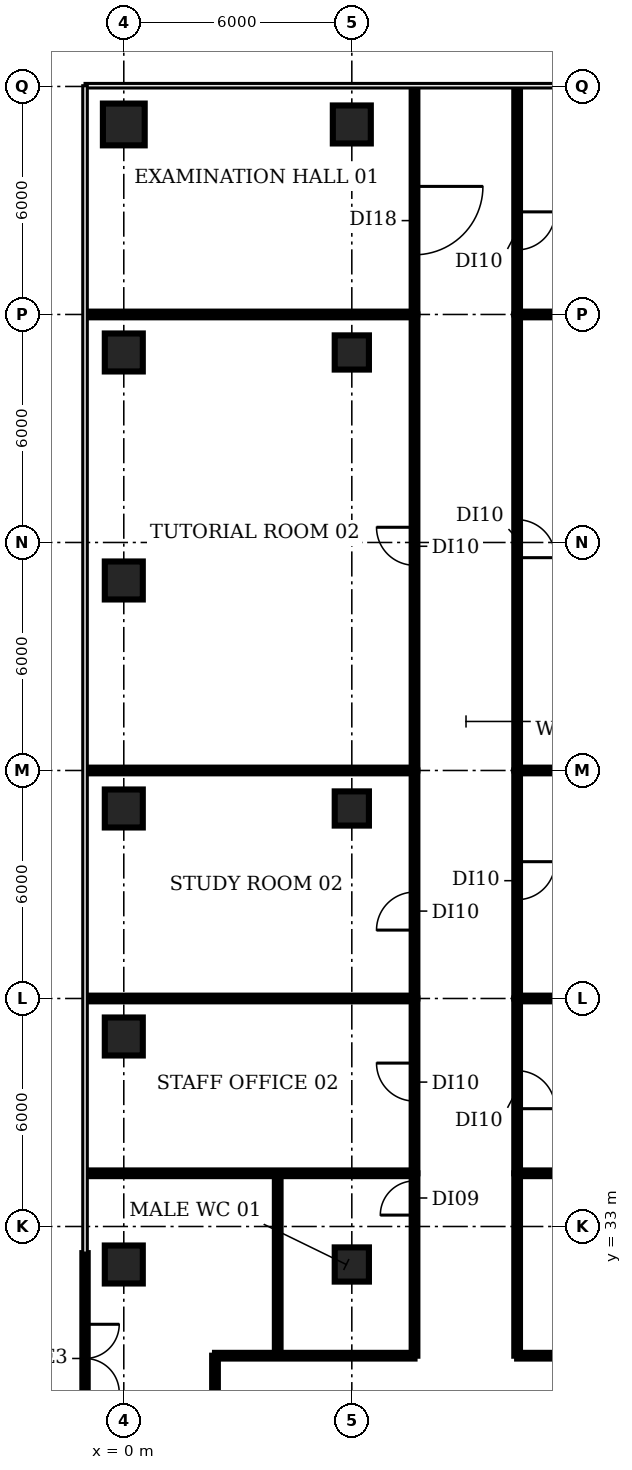
"""IFC4 building model, lengths in metres.
Left out: names, types, materials, properties, quantities, classifications, styles, units other than length and angle.
Written with IfcOpenShell. Run it as: python <this file> out.ifc"""

import sys

from ifc_helpers import new_model, si_unit, direction, frame, frame_2d, origin, origin_2d, place, context, subcontext, project, spatial, rectangle, circle, extrude, element, fill, save


model = new_model("IFC4")
c1 = context("Model", 3, precision=1e-05, world=origin(), true_north=direction((0.0, 1.0)))
c2 = subcontext(c1, "Body", "Model", "MODEL_VIEW")
j1 = project(units=[si_unit("LENGTHUNIT", "METRE"), si_unit("PLANEANGLEUNIT", "RADIAN")], contexts=[c1])
p1 = place(None, origin())
s1 = spatial("IfcSite", under=j1, at=p1, CompositionType="ELEMENT")
p2 = place(p1, origin())
s2 = spatial("IfcBuilding", under=s1, at=p2, CompositionType="ELEMENT")
p3 = place(p2, frame((0.0, 0.0, 11.0)))
s3 = spatial("IfcBuildingStorey", under=s2, at=p3, CompositionType="ELEMENT", Elevation=11.0)
for number, where, z_axis, x_axis in (
    (1, (0.0, 32.0, 0.0), (0.0, 0.0, 1.0), (1.0, 0.0, 0.0)),
    (2, (0.0, 38.0, 0.0), (0.0, 0.0, 1.0), (1.0, 0.0, 0.0)),
    (3, (0.0, 44.0, 0.0), (0.0, 0.0, 1.0), (1.0, 0.0, 0.0)),
    (4, (0.0, 50.0, 0.0), (0.0, 0.0, 1.0), (1.0, 0.0, 0.0)),
    (5, (0.0, 56.0, 0.0), (0.0, 0.0, 1.0), (1.0, 0.0, 0.0)),
):
    element("IfcColumn", number, at=place(p3, frame(where, z_axis=z_axis, x_axis=x_axis)), inside=s3, PredefinedType="COLUMN", context=c2, shape_type="SweptSolid", body=[
        extrude(rectangle(XDim=1.0, YDim=1.0, at=origin_2d()), origin(), (0.0, 0.0, 1.0), 4.15),
    ])
p4 = place(p3, frame((0.0, 62.0, 0.0), z_axis=(0.0, 0.0, 1.0), x_axis=(1.0, 0.0, 0.0)))
e6 = element("IfcColumn", 6, at=p4, inside=s3, PredefinedType="COLUMN", context=c2, shape_type="SweptSolid", body=[
    extrude(circle(Radius=0.55, at=origin_2d()), origin(), (0.0, 0.0, 1.0), 4.15),
])
for number, where, z_axis, x_axis in (
    (7, (6.0, 32.0, 0.0), (0.0, 0.0, 1.0), (1.0, 0.0, 0.0)),
    (8, (6.0, 44.0, 0.0), (0.0, 0.0, 1.0), (1.0, 0.0, 0.0)),
    (9, (6.0, 56.0, 0.0), (0.0, 0.0, 1.0), (1.0, 0.0, 0.0)),
):
    element("IfcColumn", number, at=place(p3, frame(where, z_axis=z_axis, x_axis=x_axis)), inside=s3, PredefinedType="COLUMN", context=c2, shape_type="SweptSolid", body=[
        extrude(rectangle(XDim=0.9, YDim=0.9, at=origin_2d()), origin(), (0.0, 0.0, 1.0), 4.15),
    ])
p5 = place(p3, frame((6.0, 62.0, 0.0), z_axis=(0.0, 0.0, 1.0), x_axis=(1.0, 0.0, 0.0)))
e10 = element("IfcColumn", 10, at=p5, inside=s3, PredefinedType="COLUMN", context=c2, shape_type="SweptSolid", body=[
    extrude(rectangle(XDim=1.0, YDim=1.0, at=origin_2d()), origin(), (0.0, 0.0, 1.0), 4.15),
])
p6 = place(p3, frame((-1.02, 32.299, 0.0), z_axis=(0.0, 0.0, 1.0), x_axis=(0.0, -1.0, 0.0)))
e11 = element("IfcWall", 11, at=p6, inside=s3, PredefinedType="SOLIDWALL", context=c2, shape_type="SweptSolid", body=[
    extrude(rectangle(XDim=6.144, YDim=0.14, at=frame_2d((3.072, 0.0))), origin(), (0.0, 0.0, 1.0), 4.15),
])
p7 = place(p6, frame((1.872, 0.0, 0.0)))
e12 = element("IfcOpeningElement", 12, at=p7, cuts=e11, PredefinedType="OPENING", context=c2, shape_type="SweptSolid", body=[
    extrude(rectangle(XDim=1.8, YDim=2.4, at=frame_2d((0.9, 1.2))), frame((0.0, 0.08, 0.0), z_axis=(0.0, -1.0, 0.0), x_axis=(1.0, 0.0, 0.0)), (0.0, 0.0, 1.0), 0.16),
])
for number, where, z_axis, x_axis in (
    (13, (-0.97, 34.4, 0.0), (0.0, 0.0, 1.0), (1.0, 0.0, 0.0)),
    (14, (-0.97, 39.0, 0.0), (0.0, 0.0, 1.0), (1.0, 0.0, 0.0)),
    (15, (-0.97, 45.0, 0.0), (0.0, 0.0, 1.0), (1.0, 0.0, 0.0)),
):
    element("IfcWall", number, at=place(p3, frame(where, z_axis=z_axis, x_axis=x_axis)), inside=s3, PredefinedType="PARTITIONING", context=c2, shape_type="SweptSolid", body=[
        extrude(rectangle(XDim=8.62, YDim=0.15, at=frame_2d((4.31, 0.0))), origin(), (0.0, 0.0, 1.0), 3.08),
    ])
p8 = place(p3, frame((-0.955, 57.0, 0.0), z_axis=(0.0, 0.0, 1.0), x_axis=(1.0, 0.0, 0.0)))
e16 = element("IfcWall", 16, at=p8, inside=s3, PredefinedType="PARTITIONING", context=c2, shape_type="SweptSolid", body=[
    extrude(rectangle(XDim=8.605, YDim=0.15, at=frame_2d((4.302, 0.0))), origin(), (0.0, 0.0, 1.0), 3.08),
])
p9 = place(p3, frame((2.4, 25.7, 0.0), z_axis=(0.0, 0.0, 1.0), x_axis=(0.0, 1.0, 0.0)))
e17 = element("IfcWall", 17, at=p9, inside=s3, PredefinedType="PARTITIONING", context=c2, shape_type="SweptSolid", body=[
    extrude(rectangle(XDim=3.9, YDim=0.15, at=frame_2d((1.95, 0.0))), origin(), (0.0, 0.0, 1.0), 3.08),
])
p10 = place(p3, frame((2.4, 29.6, 0.0), z_axis=(0.0, 0.0, 1.0), x_axis=(1.0, 0.0, 0.0)))
e18 = element("IfcWall", 18, at=p10, inside=s3, PredefinedType="PARTITIONING", context=c2, shape_type="SweptSolid", body=[
    extrude(rectangle(XDim=5.25, YDim=0.15, at=frame_2d((2.625, 0.0))), origin(), (0.0, 0.0, 1.0), 3.08),
])
p11 = place(p3, frame((4.05, 29.6, 0.0), z_axis=(0.0, 0.0, 1.0), x_axis=(0.0, 1.0, 0.0)))
e19 = element("IfcWall", 19, at=p11, inside=s3, PredefinedType="PARTITIONING", context=c2, shape_type="SweptSolid", body=[
    extrude(rectangle(XDim=4.8, YDim=0.15, at=frame_2d((2.4, 0.0))), origin(), (0.0, 0.0, 1.0), 3.08),
])
p12 = place(p3, frame((7.65, 29.6, 0.0), z_axis=(0.0, 0.0, 1.0), x_axis=(0.0, 1.0, 0.0)))
e20 = element("IfcWall", 20, at=p12, inside=s3, PredefinedType="PARTITIONING", context=c2, shape_type="SweptSolid", body=[
    extrude(rectangle(XDim=4.8, YDim=0.15, at=frame_2d((2.4, 0.0))), origin(), (0.0, 0.0, 1.0), 3.08),
])
p13 = place(p12, frame((3.7, 0.0, 0.0)))
e21 = element("IfcOpeningElement", 21, at=p13, cuts=e20, PredefinedType="OPENING", context=c2, shape_type="SweptSolid", body=[
    extrude(rectangle(XDim=0.9, YDim=2.1, at=frame_2d((0.45, 1.05))), frame((0.0, 0.085, 0.0), z_axis=(0.0, -1.0, 0.0), x_axis=(1.0, 0.0, 0.0)), (0.0, 0.0, 1.0), 0.17),
])
p14 = place(p3, frame((7.65, 34.4, 0.0), z_axis=(0.0, 0.0, 1.0), x_axis=(0.0, 1.0, 0.0)))
e22 = element("IfcWall", 22, at=p14, inside=s3, PredefinedType="PARTITIONING", context=c2, shape_type="SweptSolid", body=[
    extrude(rectangle(XDim=4.6, YDim=0.15, at=frame_2d((2.3, 0.0))), origin(), (0.0, 0.0, 1.0), 3.08),
])
p15 = place(p14, frame((1.9, 0.0, 0.0)))
e23 = element("IfcOpeningElement", 23, at=p15, cuts=e22, PredefinedType="OPENING", context=c2, shape_type="SweptSolid", body=[
    extrude(rectangle(XDim=1.0, YDim=2.1, at=frame_2d((0.5, 1.05))), frame((0.0, 0.085, 0.0), z_axis=(0.0, -1.0, 0.0), x_axis=(1.0, 0.0, 0.0)), (0.0, 0.0, 1.0), 0.17),
])
p16 = place(p3, frame((7.65, 39.0, 0.0), z_axis=(0.0, 0.0, 1.0), x_axis=(0.0, 1.0, 0.0)))
e24 = element("IfcWall", 24, at=p16, inside=s3, PredefinedType="PARTITIONING", context=c2, shape_type="SweptSolid", body=[
    extrude(rectangle(XDim=6.0, YDim=0.15, at=frame_2d((3.0, 0.0))), origin(), (0.0, 0.0, 1.0), 3.08),
])
p17 = place(p16, frame((1.8, 0.0, 0.0)))
e25 = element("IfcOpeningElement", 25, at=p17, cuts=e24, PredefinedType="OPENING", context=c2, shape_type="SweptSolid", body=[
    extrude(rectangle(XDim=1.0, YDim=2.1, at=frame_2d((0.5, 1.05))), frame((0.0, 0.085, 0.0), z_axis=(0.0, -1.0, 0.0), x_axis=(1.0, 0.0, 0.0)), (0.0, 0.0, 1.0), 0.17),
])
p18 = place(p3, frame((7.65, 45.0, 0.0), z_axis=(0.0, 0.0, 1.0), x_axis=(0.0, 1.0, 0.0)))
e26 = element("IfcWall", 26, at=p18, inside=s3, PredefinedType="PARTITIONING", context=c2, shape_type="SweptSolid", body=[
    extrude(rectangle(XDim=12.0, YDim=0.15, at=frame_2d((6.0, 0.0))), origin(), (0.0, 0.0, 1.0), 3.08),
])
p19 = place(p18, frame((5.4, 0.0, 0.0)))
e27 = element("IfcOpeningElement", 27, at=p19, cuts=e26, PredefinedType="OPENING", context=c2, shape_type="SweptSolid", body=[
    extrude(rectangle(XDim=1.0, YDim=2.1, at=frame_2d((0.5, 1.05))), frame((0.0, 0.085, 0.0), z_axis=(0.0, -1.0, 0.0), x_axis=(1.0, 0.0, 0.0)), (0.0, 0.0, 1.0), 0.17),
])
p20 = place(p3, frame((7.65, 62.97, 0.0), z_axis=(0.0, 0.0, 1.0), x_axis=(0.0, -1.0, 0.0)))
e28 = element("IfcWall", 28, at=p20, inside=s3, PredefinedType="PARTITIONING", context=c2, shape_type="SweptSolid", body=[
    extrude(rectangle(XDim=5.97, YDim=0.15, at=frame_2d((2.985, 0.0))), origin(), (0.0, 0.0, 1.0), 3.08),
])
p21 = place(p20, frame((2.6, 0.0, 0.0)))
e29 = element("IfcOpeningElement", 29, at=p21, cuts=e28, PredefinedType="OPENING", context=c2, shape_type="SweptSolid", body=[
    extrude(rectangle(XDim=1.8, YDim=2.1, at=frame_2d((0.9, 1.05))), frame((0.0, 0.085, 0.0), z_axis=(0.0, -1.0, 0.0), x_axis=(1.0, 0.0, 0.0)), (0.0, 0.0, 1.0), 0.17),
])
p22 = place(p3, frame((10.35, 29.6, 0.0), z_axis=(0.0, 0.0, 1.0), x_axis=(0.0, 1.0, 0.0)))
e30 = element("IfcWall", 30, at=p22, inside=s3, PredefinedType="PARTITIONING", context=c2, shape_type="SweptSolid", body=[
    extrude(rectangle(XDim=4.8, YDim=0.15, at=frame_2d((2.4, 0.0))), origin(), (0.0, 0.0, 1.0), 3.08),
])
p23 = place(p3, frame((10.35, 29.6, 0.0), z_axis=(0.0, 0.0, 1.0), x_axis=(1.0, 0.0, 0.0)))
e31 = element("IfcWall", 31, at=p23, inside=s3, PredefinedType="PARTITIONING", context=c2, shape_type="SweptSolid", body=[
    extrude(rectangle(XDim=4.05, YDim=0.15, at=frame_2d((2.025, 0.0))), origin(), (0.0, 0.0, 1.0), 3.08),
])
p24 = place(p3, frame((10.35, 34.4, 0.0), z_axis=(0.0, 0.0, 1.0), x_axis=(1.0, 0.0, 0.0)))
e32 = element("IfcWall", 32, at=p24, inside=s3, PredefinedType="PARTITIONING", context=c2, shape_type="SweptSolid", body=[
    extrude(rectangle(XDim=14.62, YDim=0.15, at=frame_2d((7.31, 0.0))), origin(), (0.0, 0.0, 1.0), 3.08),
])
p25 = place(p3, frame((10.35, 39.0, 0.0), z_axis=(0.0, 0.0, 1.0), x_axis=(0.0, -1.0, 0.0)))
e33 = element("IfcWall", 33, at=p25, inside=s3, PredefinedType="PARTITIONING", context=c2, shape_type="SweptSolid", body=[
    extrude(rectangle(XDim=4.6, YDim=0.15, at=frame_2d((2.3, 0.0))), origin(), (0.0, 0.0, 1.0), 3.08),
])
p26 = place(p25, frame((1.9, 0.0, 0.0)))
e34 = element("IfcOpeningElement", 34, at=p26, cuts=e33, PredefinedType="OPENING", context=c2, shape_type="SweptSolid", body=[
    extrude(rectangle(XDim=1.0, YDim=2.1, at=frame_2d((0.5, 1.05))), frame((0.0, 0.085, 0.0), z_axis=(0.0, -1.0, 0.0), x_axis=(1.0, 0.0, 0.0)), (0.0, 0.0, 1.0), 0.17),
])
p27 = place(p3, frame((10.35, 39.0, 0.0), z_axis=(0.0, 0.0, 1.0), x_axis=(1.0, 0.0, 0.0)))
e35 = element("IfcWall", 35, at=p27, inside=s3, PredefinedType="PARTITIONING", context=c2, shape_type="SweptSolid", body=[
    extrude(rectangle(XDim=14.62, YDim=0.15, at=frame_2d((7.31, 0.0))), origin(), (0.0, 0.0, 1.0), 3.08),
])
p28 = place(p3, frame((10.35, 45.0, 0.0), z_axis=(0.0, 0.0, 1.0), x_axis=(0.0, -1.0, 0.0)))
e36 = element("IfcWall", 36, at=p28, inside=s3, PredefinedType="PARTITIONING", context=c2, shape_type="SweptSolid", body=[
    extrude(rectangle(XDim=6.0, YDim=0.15, at=frame_2d((3.0, 0.0))), origin(), (0.0, 0.0, 1.0), 3.08),
])
p29 = place(p28, frame((2.4, 0.0, 0.0)))
e37 = element("IfcOpeningElement", 37, at=p29, cuts=e36, PredefinedType="OPENING", context=c2, shape_type="SweptSolid", body=[
    extrude(rectangle(XDim=1.0, YDim=2.1, at=frame_2d((0.5, 1.05))), frame((0.0, 0.085, 0.0), z_axis=(0.0, -1.0, 0.0), x_axis=(1.0, 0.0, 0.0)), (0.0, 0.0, 1.0), 0.17),
])
p30 = place(p3, frame((10.35, 45.0, 0.0), z_axis=(0.0, 0.0, 1.0), x_axis=(1.0, 0.0, 0.0)))
e38 = element("IfcWall", 38, at=p30, inside=s3, PredefinedType="PARTITIONING", context=c2, shape_type="SweptSolid", body=[
    extrude(rectangle(XDim=14.62, YDim=0.15, at=frame_2d((7.31, 0.0))), origin(), (0.0, 0.0, 1.0), 3.08),
])
p31 = place(p3, frame((10.35, 57.0, 0.0), z_axis=(0.0, 0.0, 1.0), x_axis=(0.0, -1.0, 0.0)))
e39 = element("IfcWall", 39, at=p31, inside=s3, PredefinedType="PARTITIONING", context=c2, shape_type="SweptSolid", body=[
    extrude(rectangle(XDim=12.0, YDim=0.15, at=frame_2d((6.0, 0.0))), origin(), (0.0, 0.0, 1.0), 3.08),
])
p32 = place(p31, frame((5.4, 0.0, 0.0)))
e40 = element("IfcOpeningElement", 40, at=p32, cuts=e39, PredefinedType="OPENING", context=c2, shape_type="SweptSolid", body=[
    extrude(rectangle(XDim=1.0, YDim=2.1, at=frame_2d((0.5, 1.05))), frame((0.0, 0.085, 0.0), z_axis=(0.0, -1.0, 0.0), x_axis=(1.0, 0.0, 0.0)), (0.0, 0.0, 1.0), 0.17),
])
p33 = place(p3, frame((10.35, 57.0, 0.0), z_axis=(0.0, 0.0, 1.0), x_axis=(1.0, 0.0, 0.0)))
e41 = element("IfcWall", 41, at=p33, inside=s3, PredefinedType="PARTITIONING", context=c2, shape_type="SweptSolid", body=[
    extrude(rectangle(XDim=14.605, YDim=0.15, at=frame_2d((7.302, 0.0))), origin(), (0.0, 0.0, 1.0), 3.08),
])
p34 = place(p3, frame((10.35, 62.97, 0.0), z_axis=(0.0, 0.0, 1.0), x_axis=(0.0, -1.0, 0.0)))
e42 = element("IfcWall", 42, at=p34, inside=s3, PredefinedType="PARTITIONING", context=c2, shape_type="SweptSolid", body=[
    extrude(rectangle(XDim=5.97, YDim=0.15, at=frame_2d((2.985, 0.0))), origin(), (0.0, 0.0, 1.0), 3.08),
])
p35 = place(p34, frame((3.27, 0.0, 0.0)))
e43 = element("IfcOpeningElement", 43, at=p35, cuts=e42, PredefinedType="OPENING", context=c2, shape_type="SweptSolid", body=[
    extrude(rectangle(XDim=1.0, YDim=2.1, at=frame_2d((0.5, 1.05))), frame((0.0, 0.085, 0.0), z_axis=(0.0, -1.0, 0.0), x_axis=(1.0, 0.0, 0.0)), (0.0, 0.0, 1.0), 0.17),
])
p36 = place(p7, origin())
e44 = element("IfcDoor", 44, at=p36, inside=s3, OperationType="DOUBLE_DOOR_DOUBLE_SWING", PredefinedType="DOOR", context=c2, shape_type="SweptSolid", body=[
    extrude(rectangle(XDim=1.8, YDim=2.4, at=frame_2d((0.9, 1.2))), frame((0.0, 0.025, 0.0), z_axis=(0.0, -1.0, 0.0), x_axis=(1.0, 0.0, 0.0)), (0.0, 0.0, 1.0), 0.05),
])
fill(e12, e44)
p37 = place(p13, origin())
e45 = element("IfcDoor", 45, at=p37, inside=s3, OperationType="SINGLE_SWING_LEFT", PredefinedType="DOOR", context=c2, shape_type="SweptSolid", body=[
    extrude(rectangle(XDim=0.9, YDim=2.1, at=frame_2d((0.45, 1.05))), frame((0.0, 0.025, 0.0), z_axis=(0.0, -1.0, 0.0), x_axis=(1.0, 0.0, 0.0)), (0.0, 0.0, 1.0), 0.05),
])
fill(e21, e45)
p38 = place(p15, origin())
e46 = element("IfcDoor", 46, at=p38, inside=s3, OperationType="SINGLE_SWING_RIGHT", PredefinedType="DOOR", context=c2, shape_type="SweptSolid", body=[
    extrude(rectangle(XDim=1.0, YDim=2.1, at=frame_2d((0.5, 1.05))), frame((0.0, 0.025, 0.0), z_axis=(0.0, -1.0, 0.0), x_axis=(1.0, 0.0, 0.0)), (0.0, 0.0, 1.0), 0.05),
])
fill(e23, e46)
p39 = place(p17, origin())
e47 = element("IfcDoor", 47, at=p39, inside=s3, OperationType="SINGLE_SWING_LEFT", PredefinedType="DOOR", context=c2, shape_type="SweptSolid", body=[
    extrude(rectangle(XDim=1.0, YDim=2.1, at=frame_2d((0.5, 1.05))), frame((0.0, 0.025, 0.0), z_axis=(0.0, -1.0, 0.0), x_axis=(1.0, 0.0, 0.0)), (0.0, 0.0, 1.0), 0.05),
])
fill(e25, e47)
p40 = place(p19, origin())
e48 = element("IfcDoor", 48, at=p40, inside=s3, OperationType="SINGLE_SWING_RIGHT", PredefinedType="DOOR", context=c2, shape_type="SweptSolid", body=[
    extrude(rectangle(XDim=1.0, YDim=2.1, at=frame_2d((0.5, 1.05))), frame((0.0, 0.025, 0.0), z_axis=(0.0, -1.0, 0.0), x_axis=(1.0, 0.0, 0.0)), (0.0, 0.0, 1.0), 0.05),
])
fill(e27, e48)
p41 = place(p21, origin())
e49 = element("IfcDoor", 49, at=p41, inside=s3, OperationType="SINGLE_SWING_LEFT", PredefinedType="DOOR", context=c2, shape_type="SweptSolid", body=[
    extrude(rectangle(XDim=1.8, YDim=2.1, at=frame_2d((0.9, 1.05))), frame((0.0, 0.025, 0.0), z_axis=(0.0, -1.0, 0.0), x_axis=(1.0, 0.0, 0.0)), (0.0, 0.0, 1.0), 0.05),
])
fill(e29, e49)
p42 = place(p26, origin())
e50 = element("IfcDoor", 50, at=p42, inside=s3, OperationType="SINGLE_SWING_RIGHT", PredefinedType="DOOR", context=c2, shape_type="SweptSolid", body=[
    extrude(rectangle(XDim=1.0, YDim=2.1, at=frame_2d((0.5, 1.05))), frame((0.0, 0.025, 0.0), z_axis=(0.0, -1.0, 0.0), x_axis=(1.0, 0.0, 0.0)), (0.0, 0.0, 1.0), 0.05),
])
fill(e34, e50)
p43 = place(p29, origin())
e51 = element("IfcDoor", 51, at=p43, inside=s3, OperationType="SINGLE_SWING_LEFT", PredefinedType="DOOR", context=c2, shape_type="SweptSolid", body=[
    extrude(rectangle(XDim=1.0, YDim=2.1, at=frame_2d((0.5, 1.05))), frame((0.0, 0.025, 0.0), z_axis=(0.0, -1.0, 0.0), x_axis=(1.0, 0.0, 0.0)), (0.0, 0.0, 1.0), 0.05),
])
fill(e37, e51)
p44 = place(p32, origin())
e52 = element("IfcDoor", 52, at=p44, inside=s3, OperationType="SINGLE_SWING_RIGHT", PredefinedType="DOOR", context=c2, shape_type="SweptSolid", body=[
    extrude(rectangle(XDim=1.0, YDim=2.1, at=frame_2d((0.5, 1.05))), frame((0.0, 0.025, 0.0), z_axis=(0.0, -1.0, 0.0), x_axis=(1.0, 0.0, 0.0)), (0.0, 0.0, 1.0), 0.05),
])
fill(e40, e52)
p45 = place(p35, origin())
e53 = element("IfcDoor", 53, at=p45, inside=s3, OperationType="SINGLE_SWING_LEFT", PredefinedType="DOOR", context=c2, shape_type="SweptSolid", body=[
    extrude(rectangle(XDim=1.0, YDim=2.1, at=frame_2d((0.5, 1.05))), frame((0.0, 0.025, 0.0), z_axis=(0.0, -1.0, 0.0), x_axis=(1.0, 0.0, 0.0)), (0.0, 0.0, 1.0), 0.05),
])
fill(e43, e53)
save(model, sys.argv[1])
